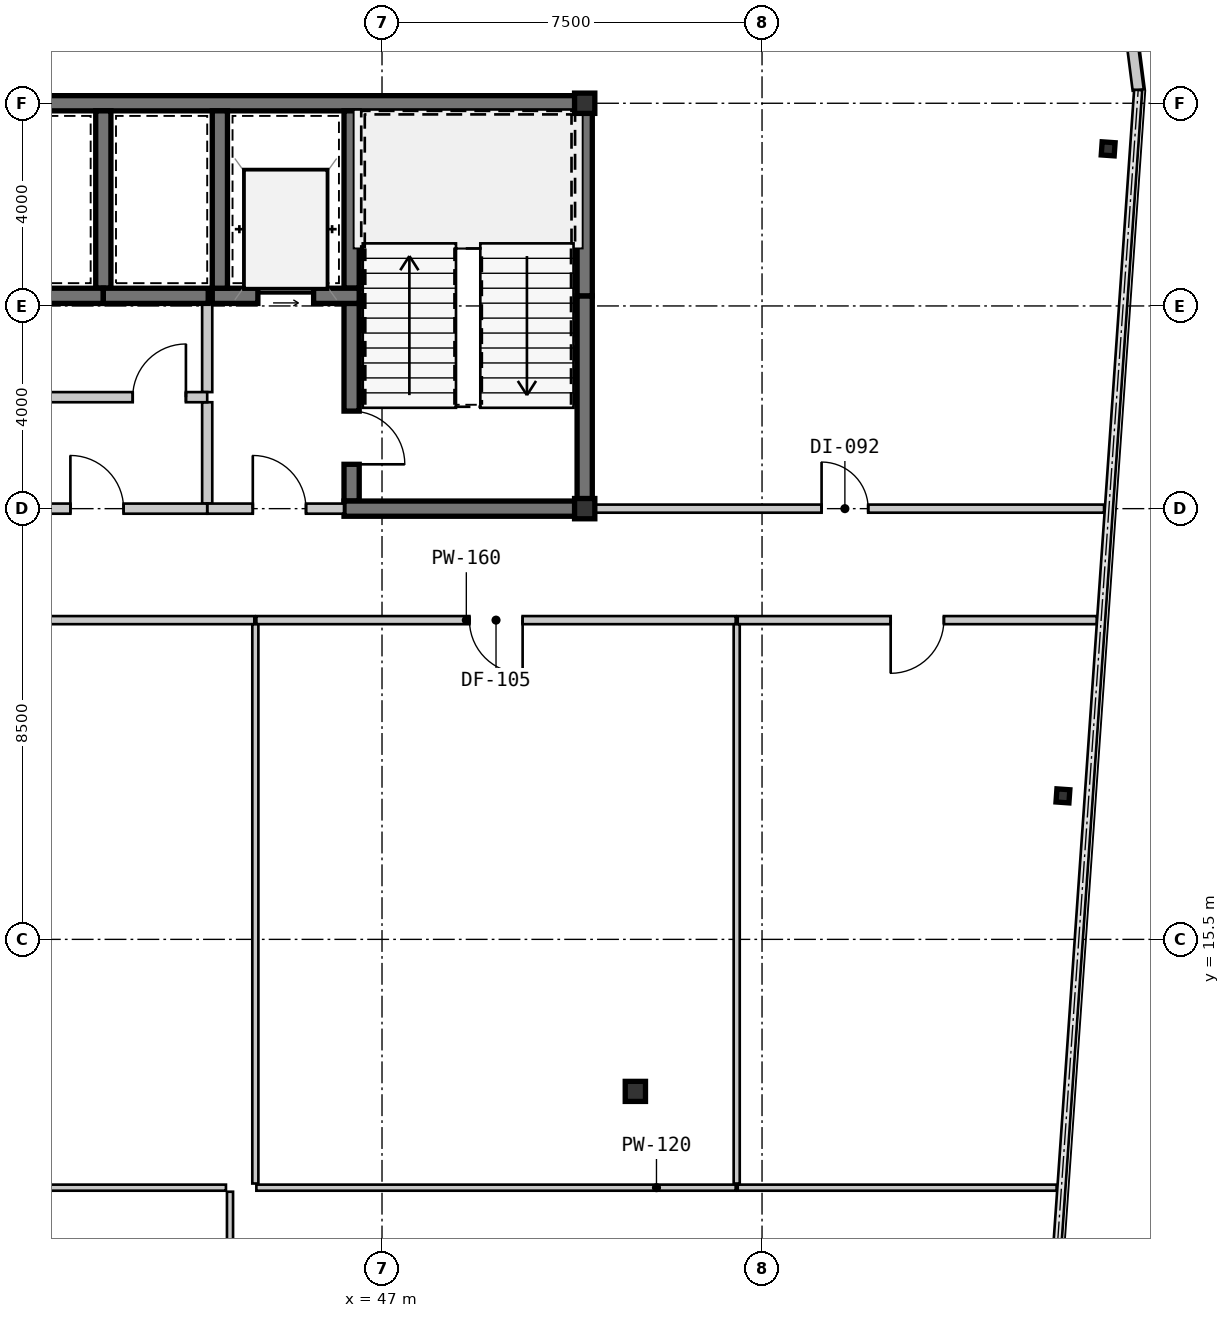
"""IFC4 building model, lengths in metres.
Left out: names, types, materials, properties, quantities, classifications, styles, units other than length and angle.
Written with IfcOpenShell. Run it as: python <this file> out.ifc"""

import sys

from ifc_helpers import new_model, si_unit, direction, frame, frame_2d, origin, origin_2d, place, context, subcontext, project, spatial, rectangle, hollow_rectangle, i_section, extrude, source, transform, mapped, element, fill, save


model = new_model("IFC4")
c1 = context("Model", 3, precision=1e-05, world=origin(), true_north=direction((0.0, 1.0)))
c2 = subcontext(c1, "Body", "Model", "MODEL_VIEW")
j1 = project(units=[si_unit("LENGTHUNIT", "METRE"), si_unit("PLANEANGLEUNIT", "RADIAN")], contexts=[c1])
p1 = place(None, origin())
s1 = spatial("IfcSite", under=j1, at=p1, CompositionType="ELEMENT")
p2 = place(p1, origin())
s2 = spatial("IfcBuilding", under=s1, at=p2, CompositionType="ELEMENT")
p3 = place(p2, frame((0.0, 0.0, 126.7)))
s3 = spatial("IfcBuildingStorey", under=s2, at=p3, CompositionType="ELEMENT", Elevation=126.7)
m1 = source(origin(), c2, "Body", "SweptSolid", [
    extrude(hollow_rectangle(XDim=0.4, YDim=0.4, WallThickness=0.016, at=origin_2d()), origin(), (0.0, 0.0, 1.0), 3.15),
])
for number, where, z_axis, x_axis in (
    (1, (51.0, 24.0, 0.0), (0.0, 0.0, 1.0), (1.0, 0.0, 0.0)),
    (2, (51.0, 32.0, 0.0), (0.0, 0.0, 1.0), (1.0, 0.0, 0.0)),
):
    element("IfcColumn", number, at=place(p3, frame(where, z_axis=z_axis, x_axis=x_axis)), inside=s3, PredefinedType="COLUMN", context=c2, shape_type="MappedRepresentation", body=[
        mapped(m1, transform((0.0, 0.0, 0.0), scale=1.0)),
    ])
m2 = source(origin(), c2, "Body", "SweptSolid", [
    extrude(i_section(OverallWidth=0.4, OverallDepth=0.396, WebThickness=0.022, FlangeThickness=0.034, at=origin_2d()), origin(), (0.0, 0.0, 1.0), 3.15),
])
p4 = place(p3, frame((52.0, 12.5, 0.0), z_axis=(0.0, 0.0, 1.0), x_axis=(1.0, 0.0, 0.0)))
e3 = element("IfcColumn", 3, at=p4, inside=s3, PredefinedType="COLUMN", context=c2, shape_type="MappedRepresentation", body=[
    mapped(m2, transform((0.0, 0.0, 0.0), scale=1.0)),
])
m3 = source(origin(), c2, "Body", "SweptSolid", [
    extrude(i_section(OverallWidth=0.256, OverallDepth=0.26, WebThickness=0.01, FlangeThickness=0.017, at=origin_2d()), origin(), (0.0, 0.0, 1.0), 3.15),
])
for number, where, z_axis, x_axis in (
    (4, (60.438, 18.332, 0.0), (0.0, 0.0, 1.0), (0.998, -0.07, 0.0)),
    (5, (61.331, 31.101, 0.0), (0.0, 0.0, 1.0), (0.998, -0.07, 0.0)),
):
    element("IfcColumn", number, at=place(p3, frame(where, z_axis=z_axis, x_axis=x_axis)), inside=s3, PredefinedType="COLUMN", context=c2, shape_type="MappedRepresentation", body=[
        mapped(m3, transform((0.0, 0.0, 0.0), scale=1.0)),
    ])
m4 = source(origin(), c2, "Body", "SweptSolid", [
    extrude(rectangle(XDim=1.116, YDim=0.22, at=frame_2d((0.558, 0.0))), origin(), (0.0, 0.0, 1.0), 2.93),
])
p5 = place(p3, frame((61.924, 32.262, 0.0), z_axis=(0.0, 0.0, 1.0), x_axis=(-0.126242535829, 0.991999406324, 0.0)))
e6 = element("IfcWall", 6, at=p5, inside=s3, PredefinedType="SOLIDWALL", context=c2, shape_type="MappedRepresentation", body=[
    mapped(m4, transform((0.0, 0.0, 0.0), scale=1.0)),
])
m5 = source(origin(), c2, "Body", "SweptSolid", [
    extrude(rectangle(XDim=11.95, YDim=0.3, at=frame_2d((5.975, 0.0))), origin(), (0.0, 0.0, 1.0), 2.93),
])
p6 = place(p3, frame((39.2, 32.0, 0.0), z_axis=(0.0, 0.0, 1.0), x_axis=(1.0, 0.0, 0.0)))
e7 = element("IfcWall", 7, at=p6, inside=s3, PredefinedType="SHEAR", context=c2, shape_type="MappedRepresentation", body=[
    mapped(m5, transform((0.0, 0.0, 0.0), scale=1.0)),
])
m6 = source(origin(), c2, "Body", "SweptSolid", [
    extrude(rectangle(XDim=4.05, YDim=0.3, at=frame_2d((2.025, 0.0))), origin(), (0.0, 0.0, 1.0), 2.93),
])
p7 = place(p3, frame((51.0, 24.15, 0.0), z_axis=(0.0, 0.0, 1.0), x_axis=(0.0, 1.0, 0.0)))
e8 = element("IfcWall", 8, at=p7, inside=s3, PredefinedType="SHEAR", context=c2, shape_type="MappedRepresentation", body=[
    mapped(m6, transform((0.0, 0.0, 0.0), scale=1.0)),
])
m7 = source(origin(), c2, "Body", "SweptSolid", [
    extrude(rectangle(XDim=3.65, YDim=0.3, at=frame_2d((1.825, 0.0))), origin(), (0.0, 0.0, 1.0), 2.93),
])
p8 = place(p3, frame((51.0, 28.2, 0.0), z_axis=(0.0, 0.0, 1.0), x_axis=(0.0, 1.0, 0.0)))
e9 = element("IfcWall", 9, at=p8, inside=s3, PredefinedType="SHEAR", context=c2, shape_type="MappedRepresentation", body=[
    mapped(m7, transform((0.0, 0.0, 0.0), scale=1.0)),
])
m8 = source(origin(), c2, "Body", "SweptSolid", [
    extrude(rectangle(XDim=3.5, YDim=0.3, at=frame_2d((1.75, 0.0))), origin(), (0.0, 0.0, 1.0), 2.93),
])
p9 = place(p3, frame((46.4, 31.85, 0.0), z_axis=(0.0, 0.0, 1.0), x_axis=(0.0, -1.0, 0.0)))
e10 = element("IfcWall", 10, at=p9, inside=s3, PredefinedType="SHEAR", context=c2, shape_type="MappedRepresentation", body=[
    mapped(m8, transform((0.0, 0.0, 0.0), scale=1.0)),
])
m9 = source(origin(), c2, "Body", "SweptSolid", [
    extrude(rectangle(XDim=3.9, YDim=0.3, at=frame_2d((1.95, 0.0))), origin(), (0.0, 0.0, 1.0), 2.93),
])
p10 = place(p3, frame((46.4, 28.05, 0.0), z_axis=(0.0, 0.0, 1.0), x_axis=(0.0, -1.0, 0.0)))
e11 = element("IfcWall", 11, at=p10, inside=s3, PredefinedType="SHEAR", context=c2, shape_type="MappedRepresentation", body=[
    mapped(m9, transform((0.0, 0.0, 0.0), scale=1.0)),
])
m10 = source(origin(), c2, "Body", "SweptSolid", [
    extrude(rectangle(XDim=1.05, YDim=2.1, at=frame_2d((0.525, 1.05))), frame((0.0, 0.16, 0.0), z_axis=(0.0, -1.0, 0.0), x_axis=(1.0, 0.0, 0.0)), (0.0, 0.0, 1.0), 0.32),
])
p11 = place(p10, frame((2.125, 0.0, 0.0)))
e12 = element("IfcOpeningElement", 12, at=p11, cuts=e11, PredefinedType="OPENING", context=c2, shape_type="MappedRepresentation", body=[
    mapped(m10, transform((0.0, 0.0, 0.0), scale=1.0)),
])
m11 = source(origin(), c2, "Body", "SweptSolid", [
    extrude(rectangle(XDim=4.9, YDim=0.3, at=frame_2d((2.45, 0.0))), origin(), (0.0, 0.0, 1.0), 2.93),
])
p12 = place(p3, frame((46.25, 24.0, 0.0), z_axis=(0.0, 0.0, 1.0), x_axis=(1.0, 0.0, 0.0)))
e13 = element("IfcWall", 13, at=p12, inside=s3, PredefinedType="SHEAR", context=c2, shape_type="MappedRepresentation", body=[
    mapped(m11, transform((0.0, 0.0, 0.0), scale=1.0)),
])
m12 = source(origin(), c2, "Body", "SweptSolid", [
    extrude(rectangle(XDim=2.9, YDim=0.3, at=frame_2d((1.45, 0.0))), origin(), (0.0, 0.0, 1.0), 2.93),
])
p13 = place(p3, frame((43.65, 28.2, 0.0), z_axis=(0.0, 0.0, 1.0), x_axis=(1.0, 0.0, 0.0)))
e14 = element("IfcWall", 14, at=p13, inside=s3, PredefinedType="SHEAR", context=c2, shape_type="MappedRepresentation", body=[
    mapped(m12, transform((0.0, 0.0, 0.0), scale=1.0)),
])
m13 = source(origin(), c2, "Body", "SweptSolid", [
    extrude(rectangle(XDim=1.1, YDim=2.15, at=frame_2d((0.55, 1.075))), frame((0.0, 0.16, 0.0), z_axis=(0.0, -1.0, 0.0), x_axis=(1.0, 0.0, 0.0)), (0.0, 0.0, 1.0), 0.32),
])
p14 = place(p13, frame((0.9, 0.0, 0.0)))
e15 = element("IfcOpeningElement", 15, at=p14, cuts=e14, PredefinedType="OPENING", context=c2, shape_type="MappedRepresentation", body=[
    mapped(m13, transform((0.0, 0.0, 0.0), scale=1.0)),
])
p15 = place(p3, frame((43.8, 31.85, 0.0), z_axis=(0.0, 0.0, 1.0), x_axis=(0.0, -1.0, 0.0)))
e16 = element("IfcWall", 16, at=p15, inside=s3, PredefinedType="SHEAR", context=c2, shape_type="MappedRepresentation", body=[
    mapped(m8, transform((0.0, 0.0, 0.0), scale=1.0)),
])
m14 = source(origin(), c2, "Body", "SweptSolid", [
    extrude(rectangle(XDim=2.0, YDim=0.2, at=frame_2d((1.0, 0.0))), origin(), (0.0, 0.0, 1.0), 2.93),
])
p16 = place(p3, frame((43.55, 26.1, 0.0), z_axis=(0.0, 0.0, 1.0), x_axis=(0.0, -1.0, 0.0)))
e17 = element("IfcWall", 17, at=p16, inside=s3, PredefinedType="SOLIDWALL", context=c2, shape_type="MappedRepresentation", body=[
    mapped(m14, transform((0.0, 0.0, 0.0), scale=1.0)),
])
m15 = source(origin(), c2, "Body", "SweptSolid", [
    extrude(rectangle(XDim=1.75, YDim=0.2, at=frame_2d((0.875, 0.0))), origin(), (0.0, 0.0, 1.0), 2.93),
])
p17 = place(p3, frame((43.55, 28.05, 0.0), z_axis=(0.0, 0.0, 1.0), x_axis=(0.0, -1.0, 0.0)))
e18 = element("IfcWall", 18, at=p17, inside=s3, PredefinedType="SOLIDWALL", context=c2, shape_type="MappedRepresentation", body=[
    mapped(m15, transform((0.0, 0.0, 0.0), scale=1.0)),
])
m16 = source(origin(), c2, "Body", "SweptSolid", [
    extrude(rectangle(XDim=2.7, YDim=0.2, at=frame_2d((1.35, 0.0))), origin(), (0.0, 0.0, 1.0), 2.397),
])
p18 = place(p3, frame((43.55, 24.0, 0.0), z_axis=(0.0, 0.0, 1.0), x_axis=(1.0, 0.0, 0.0)))
e19 = element("IfcWall", 19, at=p18, inside=s3, PredefinedType="SOLIDWALL", context=c2, shape_type="MappedRepresentation", body=[
    mapped(m16, transform((0.0, 0.0, 0.0), scale=1.0)),
])
m17 = source(origin(), c2, "Body", "SweptSolid", [
    extrude(rectangle(XDim=1.05, YDim=2.1, at=frame_2d((0.525, 1.05))), frame((0.0, 0.11, 0.0), z_axis=(0.0, -1.0, 0.0), x_axis=(1.0, 0.0, 0.0)), (0.0, 0.0, 1.0), 0.22),
])
p19 = place(p18, frame((0.9, 0.0, 0.0)))
e20 = element("IfcOpeningElement", 20, at=p19, cuts=e19, PredefinedType="OPENING", context=c2, shape_type="MappedRepresentation", body=[
    mapped(m17, transform((0.0, 0.0, 0.0), scale=1.0)),
])
p20 = place(p3, frame((41.5, 28.35, 0.0), z_axis=(0.0, 0.0, 1.0), x_axis=(0.0, 1.0, 0.0)))
e21 = element("IfcWall", 21, at=p20, inside=s3, PredefinedType="SHEAR", context=c2, shape_type="MappedRepresentation", body=[
    mapped(m8, transform((0.0, 0.0, 0.0), scale=1.0)),
])
m18 = source(origin(), c2, "Body", "SweptSolid", [
    extrude(rectangle(XDim=2.3, YDim=0.3, at=frame_2d((1.15, 0.0))), origin(), (0.0, 0.0, 1.0), 2.93),
])
p21 = place(p3, frame((39.2, 28.2, 0.0), z_axis=(0.0, 0.0, 1.0), x_axis=(1.0, 0.0, 0.0)))
e22 = element("IfcWall", 22, at=p21, inside=s3, PredefinedType="SHEAR", context=c2, shape_type="MappedRepresentation", body=[
    mapped(m18, transform((0.0, 0.0, 0.0), scale=1.0)),
])
m19 = source(origin(), c2, "Body", "SweptSolid", [
    extrude(rectangle(XDim=2.07, YDim=0.3, at=frame_2d((1.035, 0.0))), origin(), (0.0, 0.0, 1.0), 2.93),
])
p22 = place(p3, frame((41.5, 28.2, 0.0), z_axis=(0.0, 0.0, 1.0), x_axis=(1.0, 0.0, 0.0)))
e23 = element("IfcWall", 23, at=p22, inside=s3, PredefinedType="SHEAR", context=c2, shape_type="MappedRepresentation", body=[
    mapped(m19, transform((0.0, 0.0, 0.0), scale=1.0)),
])
m20 = source(origin(), c2, "Body", "SweptSolid", [
    extrude(rectangle(XDim=4.35, YDim=0.2, at=frame_2d((2.175, 0.0))), origin(), (0.0, 0.0, 1.0), 2.93),
])
p23 = place(p3, frame((39.2, 26.2, 0.0), z_axis=(0.0, 0.0, 1.0), x_axis=(1.0, 0.0, 0.0)))
e24 = element("IfcWall", 24, at=p23, inside=s3, PredefinedType="SOLIDWALL", context=c2, shape_type="MappedRepresentation", body=[
    mapped(m20, transform((0.0, 0.0, 0.0), scale=1.0)),
])
p24 = place(p23, frame((2.88, 0.0, 0.0)))
e25 = element("IfcOpeningElement", 25, at=p24, cuts=e24, PredefinedType="OPENING", context=c2, shape_type="MappedRepresentation", body=[
    mapped(m17, transform((0.0, 0.0, 0.0), scale=1.0)),
])
m21 = source(origin(), c2, "Body", "SweptSolid", [
    extrude(rectangle(XDim=4.35, YDim=0.2, at=frame_2d((2.175, 0.0))), origin(), (0.0, 0.0, 1.0), 2.397),
])
p25 = place(p3, frame((43.55, 24.0, 0.0), z_axis=(0.0, 0.0, 1.0), x_axis=(-1.0, 0.0, 0.0)))
e26 = element("IfcWall", 26, at=p25, inside=s3, PredefinedType="SOLIDWALL", context=c2, shape_type="MappedRepresentation", body=[
    mapped(m21, transform((0.0, 0.0, 0.0), scale=1.0)),
])
p26 = place(p25, frame((1.65, 0.0, 0.0)))
e27 = element("IfcOpeningElement", 27, at=p26, cuts=e26, PredefinedType="OPENING", context=c2, shape_type="MappedRepresentation", body=[
    mapped(m17, transform((0.0, 0.0, 0.0), scale=1.0)),
])
m22 = source(origin(), c2, "Body", "SweptSolid", [
    extrude(rectangle(XDim=8.26, YDim=0.16, at=frame_2d((4.13, 0.0))), origin(), (0.0, 0.0, 1.0), 2.93),
])
p27 = place(p3, frame((44.48, 21.8, 0.0), z_axis=(0.0, 0.0, 1.0), x_axis=(-1.0, 0.0, 0.0)))
e28 = element("IfcWall", 28, at=p27, inside=s3, PredefinedType="PARTITIONING", context=c2, shape_type="MappedRepresentation", body=[
    mapped(m22, transform((0.0, 0.0, 0.0), scale=1.0)),
])
m23 = source(origin(), c2, "Body", "SweptSolid", [
    extrude(rectangle(XDim=9.459, YDim=0.16, at=frame_2d((4.73, 0.0))), origin(), (0.0, 0.0, 1.0), 2.93),
])
p28 = place(p3, frame((53.98, 21.8, 0.0), z_axis=(0.0, 0.0, 1.0), x_axis=(-1.0, 0.0, 0.0)))
e29 = element("IfcWall", 29, at=p28, inside=s3, PredefinedType="PARTITIONING", context=c2, shape_type="MappedRepresentation", body=[
    mapped(m23, transform((0.0, 0.0, 0.0), scale=1.0)),
])
m24 = source(origin(), c2, "Body", "SweptSolid", [
    extrude(rectangle(XDim=1.05, YDim=2.1, at=frame_2d((0.525, 1.05))), frame((0.0, 0.09, 0.0), z_axis=(0.0, -1.0, 0.0), x_axis=(1.0, 0.0, 0.0)), (0.0, 0.0, 1.0), 0.18),
])
p29 = place(p28, frame((4.205, 0.0, 0.0)))
e30 = element("IfcOpeningElement", 30, at=p29, cuts=e29, PredefinedType="OPENING", context=c2, shape_type="MappedRepresentation", body=[
    mapped(m24, transform((0.0, 0.0, 0.0), scale=1.0)),
])
m25 = source(origin(), c2, "Body", "SweptSolid", [
    extrude(rectangle(XDim=7.087, YDim=0.16, at=frame_2d((3.543, 0.0))), origin(), (0.0, 0.0, 1.0), 2.93),
])
p30 = place(p3, frame((61.107, 21.8, 0.0), z_axis=(0.0, 0.0, 1.0), x_axis=(-1.0, 0.0, 0.0)))
e31 = element("IfcWall", 31, at=p30, inside=s3, PredefinedType="PARTITIONING", context=c2, shape_type="MappedRepresentation", body=[
    mapped(m25, transform((0.0, 0.0, 0.0), scale=1.0)),
])
p31 = place(p30, frame((3.019, 0.0, 0.0)))
e32 = element("IfcOpeningElement", 32, at=p31, cuts=e31, PredefinedType="OPENING", context=c2, shape_type="MappedRepresentation", body=[
    mapped(m24, transform((0.0, 0.0, 0.0), scale=1.0)),
])
m26 = source(origin(), c2, "Body", "SweptSolid", [
    extrude(rectangle(XDim=10.1, YDim=0.16, at=frame_2d((5.05, 0.0))), origin(), (0.0, 0.0, 1.0), 2.93),
])
p32 = place(p3, frame((51.15, 24.0, 0.0), z_axis=(0.0, 0.0, 1.0), x_axis=(1.0, 0.0, 0.0)))
e33 = element("IfcWall", 33, at=p32, inside=s3, PredefinedType="PARTITIONING", context=c2, shape_type="MappedRepresentation", body=[
    mapped(m26, transform((0.0, 0.0, 0.0), scale=1.0)),
])
m27 = source(origin(), c2, "Body", "SweptSolid", [
    extrude(rectangle(XDim=0.92, YDim=2.1, at=frame_2d((0.46, 1.05))), frame((0.0, 0.09, 0.0), z_axis=(0.0, -1.0, 0.0), x_axis=(1.0, 0.0, 0.0)), (0.0, 0.0, 1.0), 0.18),
])
p33 = place(p32, frame((4.525, 0.0, 0.0)))
e34 = element("IfcOpeningElement", 34, at=p33, cuts=e33, PredefinedType="OPENING", context=c2, shape_type="MappedRepresentation", body=[
    mapped(m27, transform((0.0, 0.0, 0.0), scale=1.0)),
])
m28 = source(origin(), c2, "Body", "SweptSolid", [
    extrude(rectangle(XDim=7.844, YDim=0.12, at=frame_2d((3.922, 0.0))), origin(), (0.0, 0.0, 1.0), 2.93),
])
p34 = place(p3, frame((44.0, 10.52, 0.0), z_axis=(0.0, 0.0, 1.0), x_axis=(0.0, -1.0, 0.0)))
e35 = element("IfcWall", 35, at=p34, inside=s3, PredefinedType="PARTITIONING", context=c2, shape_type="MappedRepresentation", body=[
    mapped(m28, transform((0.0, 0.0, 0.0), scale=1.0)),
])
m29 = source(origin(), c2, "Body", "SweptSolid", [
    extrude(rectangle(XDim=0.92, YDim=2.1, at=frame_2d((0.46, 1.05))), frame((0.0, 0.07, 0.0), z_axis=(0.0, -1.0, 0.0), x_axis=(1.0, 0.0, 0.0)), (0.0, 0.0, 1.0), 0.14),
])
p35 = place(p34, frame((3.462, 0.0, 0.0)))
e36 = element("IfcOpeningElement", 36, at=p35, cuts=e35, PredefinedType="OPENING", context=c2, shape_type="MappedRepresentation", body=[
    mapped(m29, transform((0.0, 0.0, 0.0), scale=1.0)),
])
m30 = source(origin(), c2, "Body", "SweptSolid", [
    extrude(rectangle(XDim=7.7, YDim=0.12, at=frame_2d((3.85, 0.0))), origin(), (0.0, 0.0, 1.0), 2.93),
])
p36 = place(p3, frame((36.22, 10.6, 0.0), z_axis=(0.0, 0.0, 1.0), x_axis=(1.0, 0.0, 0.0)))
e37 = element("IfcWall", 37, at=p36, inside=s3, PredefinedType="PARTITIONING", context=c2, shape_type="MappedRepresentation", body=[
    mapped(m30, transform((0.0, 0.0, 0.0), scale=1.0)),
])
m31 = source(origin(), c2, "Body", "SweptSolid", [
    extrude(rectangle(XDim=9.459, YDim=0.12, at=frame_2d((4.73, 0.0))), origin(), (0.0, 0.0, 1.0), 2.93),
])
p37 = place(p3, frame((44.52, 10.6, 0.0), z_axis=(0.0, 0.0, 1.0), x_axis=(1.0, 0.0, 0.0)))
e38 = element("IfcWall", 38, at=p37, inside=s3, PredefinedType="PARTITIONING", context=c2, shape_type="MappedRepresentation", body=[
    mapped(m31, transform((0.0, 0.0, 0.0), scale=1.0)),
])
m32 = source(origin(), c2, "Body", "SweptSolid", [
    extrude(rectangle(XDim=6.293, YDim=0.12, at=frame_2d((3.146, 0.0))), origin(), (0.0, 0.0, 1.0), 2.93),
])
p38 = place(p3, frame((54.02, 10.6, 0.0), z_axis=(0.0, 0.0, 1.0), x_axis=(1.0, 0.0, 0.0)))
e39 = element("IfcWall", 39, at=p38, inside=s3, PredefinedType="PARTITIONING", context=c2, shape_type="MappedRepresentation", body=[
    mapped(m32, transform((0.0, 0.0, 0.0), scale=1.0)),
])
m33 = source(origin(), c2, "Body", "SweptSolid", [
    extrude(rectangle(XDim=11.036, YDim=0.12, at=frame_2d((5.518, 0.0))), origin(), (0.0, 0.0, 1.0), 2.93),
])
for number, where, z_axis, x_axis in (
    (40, (44.5, 21.718, 0.0), (0.0, 0.0, 1.0), (0.0, -1.0, 0.0)),
    (41, (54.0, 21.718, 0.0), (0.0, 0.0, 1.0), (0.0, -1.0, 0.0)),
):
    element("IfcWall", number, at=place(p3, frame(where, z_axis=z_axis, x_axis=x_axis)), inside=s3, PredefinedType="PARTITIONING", context=c2, shape_type="MappedRepresentation", body=[
        mapped(m33, transform((0.0, 0.0, 0.0), scale=1.0)),
    ])
m34 = source(origin(), c2, "Body", "SweptSolid", [
    extrude(rectangle(XDim=1.05, YDim=2.1, at=frame_2d((0.525, 1.05))), frame((0.0, 0.025, 0.0), z_axis=(0.0, -1.0, 0.0), x_axis=(1.0, 0.0, 0.0)), (0.0, 0.0, 1.0), 0.05),
])
p39 = place(p11, origin())
e42 = element("IfcDoor", 42, at=p39, inside=s3, OperationType="SINGLE_SWING_RIGHT", PredefinedType="DOOR", context=c2, shape_type="MappedRepresentation", body=[
    mapped(m34, transform((0.0, 0.0, 0.0), scale=1.0)),
])
fill(e12, e42)
m35 = source(origin(), c2, "Body", "SweptSolid", [
    extrude(rectangle(XDim=1.1, YDim=2.15, at=frame_2d((0.55, 1.075))), frame((0.0, 0.025, 0.0), z_axis=(0.0, -1.0, 0.0), x_axis=(1.0, 0.0, 0.0)), (0.0, 0.0, 1.0), 0.05),
])
p40 = place(p14, origin())
e43 = element("IfcDoor", 43, at=p40, inside=s3, OperationType="SLIDING_TO_LEFT", PredefinedType="DOOR", context=c2, shape_type="MappedRepresentation", body=[
    mapped(m35, transform((0.0, 0.0, 0.0), scale=1.0)),
])
fill(e15, e43)
p41 = place(p19, origin())
e44 = element("IfcDoor", 44, at=p41, inside=s3, OperationType="SINGLE_SWING_LEFT", PredefinedType="DOOR", context=c2, shape_type="MappedRepresentation", body=[
    mapped(m34, transform((0.0, 0.0, 0.0), scale=1.0)),
])
fill(e20, e44)
p42 = place(p24, origin())
e45 = element("IfcDoor", 45, at=p42, inside=s3, OperationType="SINGLE_SWING_RIGHT", PredefinedType="DOOR", context=c2, shape_type="MappedRepresentation", body=[
    mapped(m34, transform((0.0, 0.0, 0.0), scale=1.0)),
])
fill(e25, e45)
p43 = place(p26, frame((1.05, 0.0, 0.0), z_axis=(0.0, 0.0, 1.0), x_axis=(-1.0, 0.0, 0.0)))
e46 = element("IfcDoor", 46, at=p43, inside=s3, OperationType="SINGLE_SWING_LEFT", PredefinedType="DOOR", context=c2, shape_type="MappedRepresentation", body=[
    mapped(m34, transform((0.0, 0.0, 0.0), scale=1.0)),
])
fill(e27, e46)
p44 = place(p29, origin())
e47 = element("IfcDoor", 47, at=p44, inside=s3, OperationType="SINGLE_SWING_LEFT", PredefinedType="DOOR", context=c2, shape_type="MappedRepresentation", body=[
    mapped(m34, transform((0.0, 0.0, 0.0), scale=1.0)),
])
fill(e30, e47)
p45 = place(p31, origin())
e48 = element("IfcDoor", 48, at=p45, inside=s3, OperationType="SINGLE_SWING_RIGHT", PredefinedType="DOOR", context=c2, shape_type="MappedRepresentation", body=[
    mapped(m34, transform((0.0, 0.0, 0.0), scale=1.0)),
])
fill(e32, e48)
m36 = source(origin(), c2, "Body", "SweptSolid", [
    extrude(rectangle(XDim=0.92, YDim=2.1, at=frame_2d((0.46, 1.05))), frame((0.0, 0.025, 0.0), z_axis=(0.0, -1.0, 0.0), x_axis=(1.0, 0.0, 0.0)), (0.0, 0.0, 1.0), 0.05),
])
p46 = place(p33, origin())
e49 = element("IfcDoor", 49, at=p46, inside=s3, OperationType="SINGLE_SWING_LEFT", PredefinedType="DOOR", context=c2, shape_type="MappedRepresentation", body=[
    mapped(m36, transform((0.0, 0.0, 0.0), scale=1.0)),
])
fill(e34, e49)
save(model, sys.argv[1])
